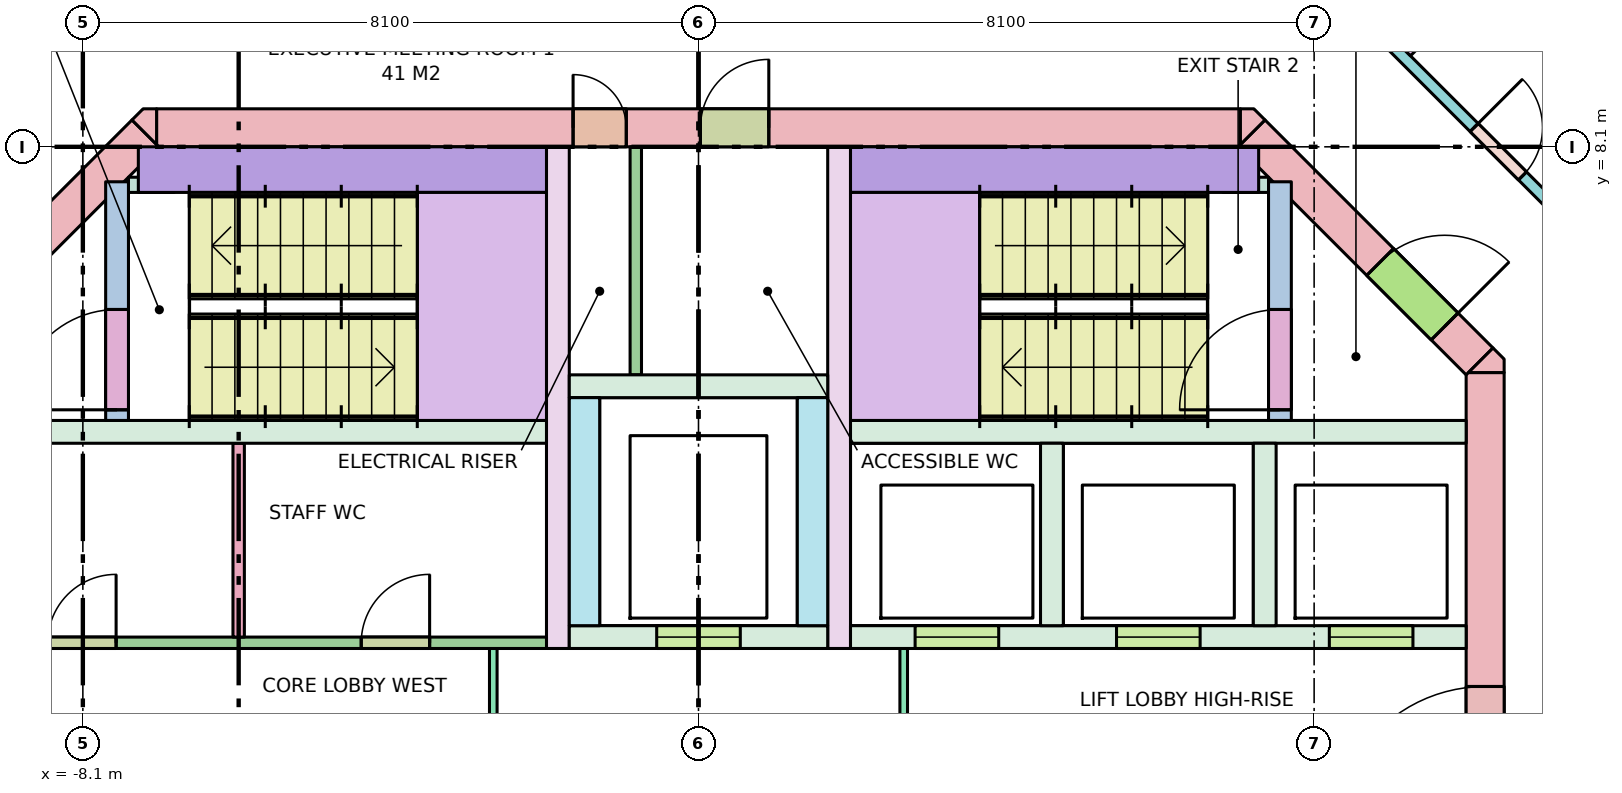
"""IFC4 building model, lengths in metres.
Left out: names, types, materials, properties, quantities, classifications, styles, units other than length and angle.
Written with IfcOpenShell. Run it as: python <this file> out.ifc"""

import sys

from ifc_helpers import new_model, si_unit, direction, frame, frame_2d, origin, place, context, subcontext, project, spatial, polyline, rectangle, outline, extrude, element, fill, save


model = new_model("IFC4")
c1 = context("Model", 3, precision=1e-05, world=origin(), true_north=direction((0.0, 1.0)))
c2 = subcontext(c1, "Body", "Model", "MODEL_VIEW")
j1 = project(units=[si_unit("LENGTHUNIT", "METRE"), si_unit("PLANEANGLEUNIT", "RADIAN")], contexts=[c1])
p1 = place(None, origin())
s1 = spatial("IfcSite", under=j1, at=p1, CompositionType="ELEMENT")
p2 = place(p1, origin())
s2 = spatial("IfcBuilding", under=s1, at=p2, CompositionType="ELEMENT")
p3 = place(p2, frame((0.0, 0.0, 287.1)))
s3 = spatial("IfcBuildingStorey", under=s2, at=p3, CompositionType="ELEMENT", Elevation=287.1)
p4 = place(p3, frame((-7.13, 8.35, -0.28), z_axis=(0.0, 0.0, 1.0), x_axis=(1.0, 0.0, 0.0)))
e1 = element("IfcWall", 1, at=p4, inside=s3, PredefinedType="SHEAR", context=c2, shape_type="SweptSolid", body=[
    extrude(rectangle(XDim=14.26, YDim=0.5, at=frame_2d((7.13, 0.0))), origin(), (0.0, 0.0, 1.0), 3.7),
])
p5 = place(p4, frame((5.48, 0.0, 0.28)))
e2 = element("IfcOpeningElement", 2, at=p5, cuts=e1, PredefinedType="OPENING", context=c2, shape_type="SweptSolid", body=[
    extrude(rectangle(XDim=0.7, YDim=2.1, at=frame_2d((0.35, 1.05))), frame((0.0, 0.26, 0.0), z_axis=(0.0, -1.0, 0.0), x_axis=(1.0, 0.0, 0.0)), (0.0, 0.0, 1.0), 0.52),
])
p6 = place(p4, frame((7.155, 0.0, 0.28)))
e3 = element("IfcOpeningElement", 3, at=p6, cuts=e1, PredefinedType="OPENING", context=c2, shape_type="SweptSolid", body=[
    extrude(rectangle(XDim=0.9, YDim=2.1, at=frame_2d((0.45, 1.05))), frame((0.0, 0.26, 0.0), z_axis=(0.0, -1.0, 0.0), x_axis=(1.0, 0.0, 0.0)), (0.0, 0.0, 1.0), 0.52),
])
p7 = place(p3, frame((10.35, -5.13, -0.28), z_axis=(0.0, 0.0, 1.0), x_axis=(0.0, 1.0, 0.0)))
e4 = element("IfcWall", 4, at=p7, inside=s3, PredefinedType="SHEAR", context=c2, shape_type="SweptSolid", body=[
    extrude(rectangle(XDim=10.26, YDim=0.5, at=frame_2d((5.13, 0.0))), origin(), (0.0, 0.0, 1.0), 3.7),
])
p8 = place(p7, frame((4.13, 0.0, 0.28)))
e5 = element("IfcOpeningElement", 5, at=p8, cuts=e4, PredefinedType="OPENING", context=c2, shape_type="SweptSolid", body=[
    extrude(rectangle(XDim=2.0, YDim=2.1, at=frame_2d((1.0, 1.05))), frame((0.0, 0.26, 0.0), z_axis=(0.0, -1.0, 0.0), x_axis=(1.0, 0.0, 0.0)), (0.0, 0.0, 1.0), 0.52),
])
p9 = place(p3, frame((-10.277, 5.277, -0.28), z_axis=(0.0, 0.0, 1.0), x_axis=(0.707106781187, 0.707106781187, 0.0)))
e6 = element("IfcWall", 6, at=p9, inside=s3, PredefinedType="SHEAR", context=c2, shape_type="SweptSolid", body=[
    extrude(rectangle(XDim=4.243, YDim=0.5, at=frame_2d((2.121, 0.0))), origin(), (0.0, 0.0, 1.0), 3.7),
])
p10 = place(p9, frame((0.65, 0.0, 0.28)))
e7 = element("IfcOpeningElement", 7, at=p10, cuts=e6, PredefinedType="OPENING", context=c2, shape_type="SweptSolid", body=[
    extrude(rectangle(XDim=1.2, YDim=2.1, at=frame_2d((0.6, 1.05))), frame((0.0, 0.26, 0.0), z_axis=(0.0, -1.0, 0.0), x_axis=(1.0, 0.0, 0.0)), (0.0, 0.0, 1.0), 0.52),
])
p11 = place(p3, frame((7.277, 8.277, -0.28), z_axis=(0.0, 0.0, 1.0), x_axis=(0.707106781187, -0.707106781187, 0.0)))
e8 = element("IfcWall", 8, at=p11, inside=s3, PredefinedType="SHEAR", context=c2, shape_type="SweptSolid", body=[
    extrude(rectangle(XDim=4.243, YDim=0.5, at=frame_2d((2.121, 0.0))), origin(), (0.0, 0.0, 1.0), 3.7),
])
p12 = place(p11, frame((2.393, 0.0, 0.28)))
e9 = element("IfcOpeningElement", 9, at=p12, cuts=e8, PredefinedType="OPENING", context=c2, shape_type="SweptSolid", body=[
    extrude(rectangle(XDim=1.2, YDim=2.1, at=frame_2d((0.6, 1.05))), frame((0.0, 0.26, 0.0), z_axis=(0.0, -1.0, 0.0), x_axis=(1.0, 0.0, 0.0)), (0.0, 0.0, 1.0), 0.52),
])
p13 = place(p3, frame((0.0, 0.0, -0.28)))
e10 = element("IfcWall", 10, at=p13, inside=s3, PredefinedType="SHEAR", context=c2, shape_type="SweptSolid", body=[
    extrude(outline(polyline([(10.6, 5.307), (10.6, 5.13), (10.13, 5.13), (10.454, 5.454), (10.6, 5.307)])), origin(), (0.0, 0.0, 1.0), 3.7),
])
p14 = place(p3, frame((0.0, 0.0, -0.28)))
e11 = element("IfcWall", 11, at=p14, inside=s3, PredefinedType="SHEAR", context=c2, shape_type="SweptSolid", body=[
    extrude(outline(polyline([(-7.307, 8.6), (-7.13, 8.6), (-7.13, 8.13), (-7.454, 8.454), (-7.307, 8.6)])), origin(), (0.0, 0.0, 1.0), 3.7),
])
p15 = place(p3, frame((0.0, 0.0, -0.28)))
e12 = element("IfcWall", 12, at=p15, inside=s3, PredefinedType="SHEAR", context=c2, shape_type="SweptSolid", body=[
    extrude(outline(polyline([(7.307, 8.6), (7.454, 8.454), (7.13, 8.13), (7.13, 8.6), (7.307, 8.6)])), origin(), (0.0, 0.0, 1.0), 3.7),
])
for number, where, z_axis, x_axis in (
    (13, (-10.1, 4.35, 0.0), (0.0, 0.0, 1.0), (1.0, 0.0, 0.0)),
    (14, (2.0, 4.35, 0.0), (0.0, 0.0, 1.0), (1.0, 0.0, 0.0)),
):
    element("IfcWall", number, at=place(p3, frame(where, z_axis=z_axis, x_axis=x_axis)), inside=s3, PredefinedType="SOLIDWALL", context=c2, shape_type="SweptSolid", body=[
        extrude(rectangle(XDim=8.1, YDim=0.3, at=frame_2d((4.05, 0.0))), origin(), (0.0, 0.0, 1.0), 3.42),
    ])
p16 = place(p3, frame((2.0, 1.65, 0.0), z_axis=(0.0, 0.0, 1.0), x_axis=(1.0, 0.0, 0.0)))
e15 = element("IfcWall", 15, at=p16, inside=s3, PredefinedType="SOLIDWALL", context=c2, shape_type="SweptSolid", body=[
    extrude(rectangle(XDim=8.1, YDim=0.3, at=frame_2d((4.05, 0.0))), origin(), (0.0, 0.0, 1.0), 3.42),
])
p17 = place(p16, frame((0.85, 0.0, 0.0)))
e16 = element("IfcOpeningElement", 16, at=p17, cuts=e15, PredefinedType="OPENING", context=c2, shape_type="SweptSolid", body=[
    extrude(rectangle(XDim=1.1, YDim=2.1, at=frame_2d((0.55, 1.05))), frame((0.0, 0.16, 0.0), z_axis=(0.0, -1.0, 0.0), x_axis=(1.0, 0.0, 0.0)), (0.0, 0.0, 1.0), 0.32),
])
p18 = place(p16, frame((3.5, 0.0, 0.0)))
e17 = element("IfcOpeningElement", 17, at=p18, cuts=e15, PredefinedType="OPENING", context=c2, shape_type="SweptSolid", body=[
    extrude(rectangle(XDim=1.1, YDim=2.1, at=frame_2d((0.55, 1.05))), frame((0.0, 0.16, 0.0), z_axis=(0.0, -1.0, 0.0), x_axis=(1.0, 0.0, 0.0)), (0.0, 0.0, 1.0), 0.32),
])
p19 = place(p16, frame((6.3, 0.0, 0.0)))
e18 = element("IfcOpeningElement", 18, at=p19, cuts=e15, PredefinedType="OPENING", context=c2, shape_type="SweptSolid", body=[
    extrude(rectangle(XDim=1.1, YDim=2.1, at=frame_2d((0.55, 1.05))), frame((0.0, 0.16, 0.0), z_axis=(0.0, -1.0, 0.0), x_axis=(1.0, 0.0, 0.0)), (0.0, 0.0, 1.0), 0.32),
])
for number, where, z_axis, x_axis in (
    (19, (4.65, 1.8, 0.0), (0.0, 0.0, 1.0), (0.0, 1.0, 0.0)),
    (20, (7.45, 1.8, 0.0), (0.0, 0.0, 1.0), (0.0, 1.0, 0.0)),
):
    element("IfcWall", number, at=place(p3, frame(where, z_axis=z_axis, x_axis=x_axis)), inside=s3, PredefinedType="SOLIDWALL", context=c2, shape_type="SweptSolid", body=[
        extrude(rectangle(XDim=2.4, YDim=0.3, at=frame_2d((1.2, 0.0))), origin(), (0.0, 0.0, 1.0), 3.42),
    ])
for number, where, z_axis, x_axis in (
    (21, (-1.85, 1.5, 0.0), (0.0, 0.0, 1.0), (0.0, 1.0, 0.0)),
    (22, (1.85, 1.5, 0.0), (0.0, 0.0, 1.0), (0.0, 1.0, 0.0)),
):
    element("IfcWall", number, at=place(p3, frame(where, z_axis=z_axis, x_axis=x_axis)), inside=s3, PredefinedType="SHEAR", context=c2, shape_type="SweptSolid", body=[
        extrude(rectangle(XDim=6.6, YDim=0.3, at=frame_2d((3.3, 0.0))), origin(), (0.0, 0.0, 1.0), 3.42),
    ])
p20 = place(p3, frame((-1.7, 1.65, 0.0), z_axis=(0.0, 0.0, 1.0), x_axis=(1.0, 0.0, 0.0)))
e23 = element("IfcWall", 23, at=p20, inside=s3, PredefinedType="SOLIDWALL", context=c2, shape_type="SweptSolid", body=[
    extrude(rectangle(XDim=3.4, YDim=0.3, at=frame_2d((1.7, 0.0))), origin(), (0.0, 0.0, 1.0), 3.42),
])
p21 = place(p20, frame((1.15, 0.0, 0.0)))
e24 = element("IfcOpeningElement", 24, at=p21, cuts=e23, PredefinedType="OPENING", context=c2, shape_type="SweptSolid", body=[
    extrude(rectangle(XDim=1.1, YDim=2.1, at=frame_2d((0.55, 1.05))), frame((0.0, 0.16, 0.0), z_axis=(0.0, -1.0, 0.0), x_axis=(1.0, 0.0, 0.0)), (0.0, 0.0, 1.0), 0.32),
])
for number, where, z_axis, x_axis in (
    (25, (-1.5, 1.8, 0.0), (0.0, 0.0, 1.0), (0.0, 1.0, 0.0)),
    (26, (1.5, 1.8, 0.0), (0.0, 0.0, 1.0), (0.0, 1.0, 0.0)),
):
    element("IfcWall", number, at=place(p3, frame(where, z_axis=z_axis, x_axis=x_axis)), inside=s3, PredefinedType="SOLIDWALL", context=c2, shape_type="SweptSolid", body=[
        extrude(rectangle(XDim=3.0, YDim=0.4, at=frame_2d((1.5, 0.0))), origin(), (0.0, 0.0, 1.0), 3.42),
    ])
p22 = place(p3, frame((-1.7, 4.95, 0.0), z_axis=(0.0, 0.0, 1.0), x_axis=(1.0, 0.0, 0.0)))
e27 = element("IfcWall", 27, at=p22, inside=s3, PredefinedType="SOLIDWALL", context=c2, shape_type="SweptSolid", body=[
    extrude(rectangle(XDim=3.4, YDim=0.3, at=frame_2d((1.7, 0.0))), origin(), (0.0, 0.0, 1.0), 3.42),
])
p23 = place(p3, frame((-7.65, 4.5, 0.0), z_axis=(0.0, 0.0, 1.0), x_axis=(0.0, 1.0, 0.0)))
e28 = element("IfcWall", 28, at=p23, inside=s3, PredefinedType="SHEAR", context=c2, shape_type="SweptSolid", body=[
    extrude(rectangle(XDim=3.14, YDim=0.3, at=frame_2d((1.57, 0.0))), origin(), (0.0, 0.0, 1.0), 3.42),
])
p24 = place(p23, frame((0.14, 0.0, 0.0)))
e29 = element("IfcOpeningElement", 29, at=p24, cuts=e28, PredefinedType="OPENING", context=c2, shape_type="SweptSolid", body=[
    extrude(rectangle(XDim=1.32, YDim=2.1, at=frame_2d((0.66, 1.05))), frame((0.0, 0.16, 0.0), z_axis=(0.0, -1.0, 0.0), x_axis=(1.0, 0.0, 0.0)), (0.0, 0.0, 1.0), 0.32),
])
p25 = place(p3, frame((-7.37, 7.8, 0.0), z_axis=(0.0, 0.0, 1.0), x_axis=(1.0, 0.0, 0.0)))
e30 = element("IfcWall", 30, at=p25, inside=s3, PredefinedType="SHEAR", context=c2, shape_type="SweptSolid", body=[
    extrude(rectangle(XDim=5.37, YDim=0.6, at=frame_2d((2.685, 0.0))), origin(), (0.0, 0.0, 1.0), 3.42),
])
p26 = place(p3, frame((7.65, 4.5, 0.0), z_axis=(0.0, 0.0, 1.0), x_axis=(0.0, 1.0, 0.0)))
e31 = element("IfcWall", 31, at=p26, inside=s3, PredefinedType="SHEAR", context=c2, shape_type="SweptSolid", body=[
    extrude(rectangle(XDim=3.14, YDim=0.3, at=frame_2d((1.57, 0.0))), origin(), (0.0, 0.0, 1.0), 3.42),
])
p27 = place(p26, frame((0.14, 0.0, 0.0)))
e32 = element("IfcOpeningElement", 32, at=p27, cuts=e31, PredefinedType="OPENING", context=c2, shape_type="SweptSolid", body=[
    extrude(rectangle(XDim=1.32, YDim=2.1, at=frame_2d((0.66, 1.05))), frame((0.0, 0.16, 0.0), z_axis=(0.0, -1.0, 0.0), x_axis=(1.0, 0.0, 0.0)), (0.0, 0.0, 1.0), 0.32),
])
p28 = place(p3, frame((2.0, 7.8, 0.0), z_axis=(0.0, 0.0, 1.0), x_axis=(1.0, 0.0, 0.0)))
e33 = element("IfcWall", 33, at=p28, inside=s3, PredefinedType="SHEAR", context=c2, shape_type="SweptSolid", body=[
    extrude(rectangle(XDim=5.37, YDim=0.6, at=frame_2d((2.685, 0.0))), origin(), (0.0, 0.0, 1.0), 3.42),
])
for number, where, z_axis, x_axis in (
    (34, (-7.5, 7.6, 0.0), (0.0, 0.0, 1.0), (1.0, 0.0, 0.0)),
    (35, (6.9, 7.6, 0.0), (0.0, 0.0, 1.0), (1.0, 0.0, 0.0)),
):
    element("IfcWall", number, at=place(p3, frame(where, z_axis=z_axis, x_axis=x_axis)), inside=s3, PredefinedType="SHEAR", context=c2, shape_type="SweptSolid", body=[
        extrude(rectangle(XDim=0.6, YDim=0.2, at=frame_2d((0.3, 0.0))), origin(), (0.0, 0.0, 1.0), 3.42),
    ])
p29 = place(p3, frame((-2.7, -1.5, 0.0), z_axis=(0.0, 0.0, 1.0), x_axis=(0.0, 1.0, 0.0)))
e36 = element("IfcWall", 36, at=p29, inside=s3, PredefinedType="PARTITIONING", context=c2, shape_type="SweptSolid", body=[
    extrude(rectangle(XDim=3.0, YDim=0.1, at=frame_2d((1.5, 0.0))), origin(), (0.0, 0.0, 1.0), 3.42),
])
p30 = place(p29, frame((0.9, 0.0, 0.0)))
e37 = element("IfcOpeningElement", 37, at=p30, cuts=e36, PredefinedType="OPENING", context=c2, shape_type="SweptSolid", body=[
    extrude(rectangle(XDim=1.2, YDim=2.1, at=frame_2d((0.6, 1.05))), frame((0.0, 0.06, 0.0), z_axis=(0.0, -1.0, 0.0), x_axis=(1.0, 0.0, 0.0)), (0.0, 0.0, 1.0), 0.12),
])
p31 = place(p3, frame((2.7, -1.5, 0.0), z_axis=(0.0, 0.0, 1.0), x_axis=(0.0, 1.0, 0.0)))
e38 = element("IfcWall", 38, at=p31, inside=s3, PredefinedType="PARTITIONING", context=c2, shape_type="SweptSolid", body=[
    extrude(rectangle(XDim=3.0, YDim=0.1, at=frame_2d((1.5, 0.0))), origin(), (0.0, 0.0, 1.0), 3.42),
])
p32 = place(p31, frame((0.9, 0.0, 0.0)))
e39 = element("IfcOpeningElement", 39, at=p32, cuts=e38, PredefinedType="OPENING", context=c2, shape_type="SweptSolid", body=[
    extrude(rectangle(XDim=1.2, YDim=2.1, at=frame_2d((0.6, 1.05))), frame((0.0, 0.06, 0.0), z_axis=(0.0, -1.0, 0.0), x_axis=(1.0, 0.0, 0.0)), (0.0, 0.0, 1.0), 0.12),
])
p33 = place(p3, frame((-0.825, 5.1, 0.0), z_axis=(0.0, 0.0, 1.0), x_axis=(0.0, 1.0, 0.0)))
e40 = element("IfcWall", 40, at=p33, inside=s3, PredefinedType="PARTITIONING", context=c2, shape_type="SweptSolid", body=[
    extrude(rectangle(XDim=3.0, YDim=0.15, at=frame_2d((1.5, 0.0))), origin(), (0.0, 0.0, 1.0), 3.42),
])
p34 = place(p3, frame((-6.05, 1.65, 0.0), z_axis=(0.0, 0.0, 1.0), x_axis=(0.0, 1.0, 0.0)))
e41 = element("IfcWall", 41, at=p34, inside=s3, PredefinedType="PARTITIONING", context=c2, shape_type="SweptSolid", body=[
    extrude(rectangle(XDim=2.55, YDim=0.15, at=frame_2d((1.275, 0.0))), origin(), (0.0, 0.0, 1.0), 3.42),
])
p35 = place(p3, frame((-10.1, 1.575, 0.0), z_axis=(0.0, 0.0, 1.0), x_axis=(1.0, 0.0, 0.0)))
e42 = element("IfcWall", 42, at=p35, inside=s3, PredefinedType="PARTITIONING", context=c2, shape_type="SweptSolid", body=[
    extrude(rectangle(XDim=8.1, YDim=0.15, at=frame_2d((4.05, 0.0))), origin(), (0.0, 0.0, 1.0), 3.42),
])
p36 = place(p35, frame((1.538, 0.0, 0.0)))
e43 = element("IfcOpeningElement", 43, at=p36, cuts=e42, PredefinedType="OPENING", context=c2, shape_type="SweptSolid", body=[
    extrude(rectangle(XDim=0.9, YDim=2.1, at=frame_2d((0.45, 1.05))), frame((0.0, 0.085, 0.0), z_axis=(0.0, -1.0, 0.0), x_axis=(1.0, 0.0, 0.0)), (0.0, 0.0, 1.0), 0.17),
])
p37 = place(p35, frame((5.663, 0.0, 0.0)))
e44 = element("IfcOpeningElement", 44, at=p37, cuts=e42, PredefinedType="OPENING", context=c2, shape_type="SweptSolid", body=[
    extrude(rectangle(XDim=0.9, YDim=2.1, at=frame_2d((0.45, 1.05))), frame((0.0, 0.085, 0.0), z_axis=(0.0, -1.0, 0.0), x_axis=(1.0, 0.0, 0.0)), (0.0, 0.0, 1.0), 0.17),
])
p38 = place(p3, frame((-12.438, 6.121, 0.0), z_axis=(0.0, 0.0, 1.0), x_axis=(0.707106781187, 0.707106781187, 0.0)))
e45 = element("IfcWall", 45, at=p38, inside=s3, PredefinedType="PARTITIONING", context=c2, shape_type="SweptSolid", body=[
    extrude(rectangle(XDim=6.105, YDim=0.15, at=frame_2d((3.053, 0.0))), origin(), (0.0, 0.0, 1.0), 2.57),
])
p39 = place(p38, frame((3.002, 0.0, 0.0)))
e46 = element("IfcOpeningElement", 46, at=p39, cuts=e45, PredefinedType="OPENING", context=c2, shape_type="SweptSolid", body=[
    extrude(rectangle(XDim=1.0, YDim=2.1, at=frame_2d((0.5, 1.05))), frame((0.0, 0.085, 0.0), z_axis=(0.0, -1.0, 0.0), x_axis=(1.0, 0.0, 0.0)), (0.0, 0.0, 1.0), 0.17),
])
p40 = place(p3, frame((8.121, 10.438, 0.0), z_axis=(0.0, 0.0, 1.0), x_axis=(0.707106781187, -0.707106781187, 0.0)))
e47 = element("IfcWall", 47, at=p40, inside=s3, PredefinedType="PARTITIONING", context=c2, shape_type="SweptSolid", body=[
    extrude(rectangle(XDim=6.105, YDim=0.15, at=frame_2d((3.053, 0.0))), origin(), (0.0, 0.0, 1.0), 2.57),
])
p41 = place(p40, frame((2.948, 0.0, 0.0)))
e48 = element("IfcOpeningElement", 48, at=p41, cuts=e47, PredefinedType="OPENING", context=c2, shape_type="SweptSolid", body=[
    extrude(rectangle(XDim=0.9, YDim=2.1, at=frame_2d((0.45, 1.05))), frame((0.0, 0.085, 0.0), z_axis=(0.0, -1.0, 0.0), x_axis=(1.0, 0.0, 0.0)), (0.0, 0.0, 1.0), 0.17),
])
p42 = place(p3, frame((9.333, 9.333, 0.0), z_axis=(0.0, 0.0, 1.0), x_axis=(0.707106781187, 0.707106781187, 0.0)))
e49 = element("IfcWall", 49, at=p42, inside=s3, PredefinedType="PARTITIONING", context=c2, shape_type="SweptSolid", body=[
    extrude(rectangle(XDim=8.139, YDim=0.1, at=frame_2d((4.069, 0.0))), origin(), (0.0, 0.0, 1.0), 2.57),
])
p43 = place(p17, origin())
e50 = element("IfcDoor", 50, at=p43, inside=s3, OperationType="DOUBLE_DOOR_SLIDING", PredefinedType="DOOR", context=c2, shape_type="SweptSolid", body=[
    extrude(rectangle(XDim=1.1, YDim=2.1, at=frame_2d((0.55, 1.05))), frame((0.0, 0.025, 0.0), z_axis=(0.0, -1.0, 0.0), x_axis=(1.0, 0.0, 0.0)), (0.0, 0.0, 1.0), 0.05),
])
fill(e16, e50)
p44 = place(p18, origin())
e51 = element("IfcDoor", 51, at=p44, inside=s3, OperationType="DOUBLE_DOOR_SLIDING", PredefinedType="DOOR", context=c2, shape_type="SweptSolid", body=[
    extrude(rectangle(XDim=1.1, YDim=2.1, at=frame_2d((0.55, 1.05))), frame((0.0, 0.025, 0.0), z_axis=(0.0, -1.0, 0.0), x_axis=(1.0, 0.0, 0.0)), (0.0, 0.0, 1.0), 0.05),
])
fill(e17, e51)
p45 = place(p19, origin())
e52 = element("IfcDoor", 52, at=p45, inside=s3, OperationType="DOUBLE_DOOR_SLIDING", PredefinedType="DOOR", context=c2, shape_type="SweptSolid", body=[
    extrude(rectangle(XDim=1.1, YDim=2.1, at=frame_2d((0.55, 1.05))), frame((0.0, 0.025, 0.0), z_axis=(0.0, -1.0, 0.0), x_axis=(1.0, 0.0, 0.0)), (0.0, 0.0, 1.0), 0.05),
])
fill(e18, e52)
p46 = place(p21, origin())
e53 = element("IfcDoor", 53, at=p46, inside=s3, OperationType="DOUBLE_DOOR_SLIDING", PredefinedType="DOOR", context=c2, shape_type="SweptSolid", body=[
    extrude(rectangle(XDim=1.1, YDim=2.1, at=frame_2d((0.55, 1.05))), frame((0.0, 0.025, 0.0), z_axis=(0.0, -1.0, 0.0), x_axis=(1.0, 0.0, 0.0)), (0.0, 0.0, 1.0), 0.05),
])
fill(e24, e53)
p47 = place(p24, origin())
e54 = element("IfcDoor", 54, at=p47, inside=s3, OperationType="DOUBLE_DOOR_SINGLE_SWING", PredefinedType="DOOR", context=c2, shape_type="SweptSolid", body=[
    extrude(rectangle(XDim=1.32, YDim=2.1, at=frame_2d((0.66, 1.05))), frame((0.0, 0.025, 0.0), z_axis=(0.0, -1.0, 0.0), x_axis=(1.0, 0.0, 0.0)), (0.0, 0.0, 1.0), 0.05),
])
fill(e29, e54)
p48 = place(p27, origin())
e55 = element("IfcDoor", 55, at=p48, inside=s3, OperationType="DOUBLE_DOOR_SINGLE_SWING", PredefinedType="DOOR", context=c2, shape_type="SweptSolid", body=[
    extrude(rectangle(XDim=1.32, YDim=2.1, at=frame_2d((0.66, 1.05))), frame((0.0, 0.025, 0.0), z_axis=(0.0, -1.0, 0.0), x_axis=(1.0, 0.0, 0.0)), (0.0, 0.0, 1.0), 0.05),
])
fill(e32, e55)
p49 = place(p12, origin())
e56 = element("IfcDoor", 56, at=p49, inside=s3, OperationType="SINGLE_SWING_RIGHT", PredefinedType="DOOR", context=c2, shape_type="SweptSolid", body=[
    extrude(rectangle(XDim=1.2, YDim=2.1, at=frame_2d((0.6, 1.05))), frame((0.0, 0.025, 0.0), z_axis=(0.0, -1.0, 0.0), x_axis=(1.0, 0.0, 0.0)), (0.0, 0.0, 1.0), 0.05),
])
fill(e9, e56)
p50 = place(p8, origin())
e57 = element("IfcDoor", 57, at=p50, inside=s3, OperationType="DOUBLE_DOOR_SINGLE_SWING", PredefinedType="DOOR", context=c2, shape_type="SweptSolid", body=[
    extrude(rectangle(XDim=2.0, YDim=2.1, at=frame_2d((1.0, 1.05))), frame((0.0, 0.025, 0.0), z_axis=(0.0, -1.0, 0.0), x_axis=(1.0, 0.0, 0.0)), (0.0, 0.0, 1.0), 0.05),
])
fill(e5, e57)
p51 = place(p5, origin())
e58 = element("IfcDoor", 58, at=p51, inside=s3, OperationType="SINGLE_SWING_LEFT", PredefinedType="DOOR", context=c2, shape_type="SweptSolid", body=[
    extrude(rectangle(XDim=0.7, YDim=2.1, at=frame_2d((0.35, 1.05))), frame((0.0, 0.025, 0.0), z_axis=(0.0, -1.0, 0.0), x_axis=(1.0, 0.0, 0.0)), (0.0, 0.0, 1.0), 0.05),
])
fill(e2, e58)
p52 = place(p6, origin())
e59 = element("IfcDoor", 59, at=p52, inside=s3, OperationType="SINGLE_SWING_RIGHT", PredefinedType="DOOR", context=c2, shape_type="SweptSolid", body=[
    extrude(rectangle(XDim=0.9, YDim=2.1, at=frame_2d((0.45, 1.05))), frame((0.0, 0.025, 0.0), z_axis=(0.0, -1.0, 0.0), x_axis=(1.0, 0.0, 0.0)), (0.0, 0.0, 1.0), 0.05),
])
fill(e3, e59)
p53 = place(p36, origin())
e60 = element("IfcDoor", 60, at=p53, inside=s3, OperationType="SINGLE_SWING_RIGHT", PredefinedType="DOOR", context=c2, shape_type="SweptSolid", body=[
    extrude(rectangle(XDim=0.9, YDim=2.1, at=frame_2d((0.45, 1.05))), frame((0.0, 0.025, 0.0), z_axis=(0.0, -1.0, 0.0), x_axis=(1.0, 0.0, 0.0)), (0.0, 0.0, 1.0), 0.05),
])
fill(e43, e60)
p54 = place(p37, origin())
e61 = element("IfcDoor", 61, at=p54, inside=s3, OperationType="SINGLE_SWING_RIGHT", PredefinedType="DOOR", context=c2, shape_type="SweptSolid", body=[
    extrude(rectangle(XDim=0.9, YDim=2.1, at=frame_2d((0.45, 1.05))), frame((0.0, 0.025, 0.0), z_axis=(0.0, -1.0, 0.0), x_axis=(1.0, 0.0, 0.0)), (0.0, 0.0, 1.0), 0.05),
])
fill(e44, e61)
p55 = place(p41, origin())
e62 = element("IfcDoor", 62, at=p55, inside=s3, OperationType="SINGLE_SWING_LEFT", PredefinedType="DOOR", context=c2, shape_type="SweptSolid", body=[
    extrude(rectangle(XDim=0.9, YDim=2.1, at=frame_2d((0.45, 1.05))), frame((0.0, 0.025, 0.0), z_axis=(0.0, -1.0, 0.0), x_axis=(1.0, 0.0, 0.0)), (0.0, 0.0, 1.0), 0.05),
])
fill(e48, e62)
save(model, sys.argv[1])
